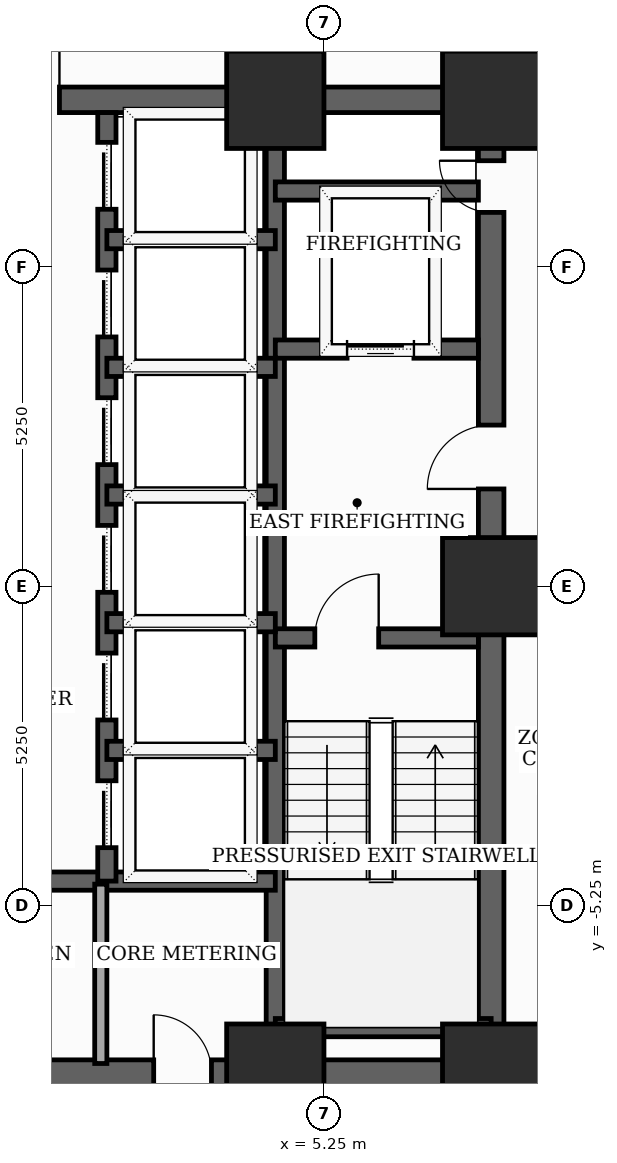
"""IFC4 building model, lengths in metres.
Left out: names, types, materials, properties, quantities, classifications, styles, units other than length and angle.
Written with IfcOpenShell. Run it as: python <this file> out.ifc"""

import sys

from ifc_helpers import new_model, si_unit, direction, frame, frame_2d, origin, origin_2d, place, context, subcontext, project, spatial, rectangle, extrude, element, fill, save


model = new_model("IFC4")
c1 = context("Model", 3, precision=1e-05, world=origin(), true_north=direction((0.0, 1.0)))
c2 = subcontext(c1, "Body", "Model", "MODEL_VIEW")
j1 = project(units=[si_unit("LENGTHUNIT", "METRE"), si_unit("PLANEANGLEUNIT", "RADIAN")], contexts=[c1])
p1 = place(None, origin())
s1 = spatial("IfcSite", under=j1, at=p1, CompositionType="ELEMENT")
p2 = place(p1, origin())
s2 = spatial("IfcBuilding", under=s1, at=p2, CompositionType="ELEMENT")
p3 = place(p2, frame((0.0, 0.0, 44.5)))
s3 = spatial("IfcBuildingStorey", under=s2, at=p3, CompositionType="ELEMENT", Elevation=44.5)
for number, where, z_axis, x_axis in (
    (1, (4.45, -8.0, 0.0), (0.0, 0.0, 1.0), (1.0, 0.0, 0.0)),
    (2, (8.0, -8.0, 0.0), (0.0, 0.0, 1.0), (1.0, 0.0, 0.0)),
    (3, (8.0, 0.0, 0.0), (0.0, 0.0, 1.0), (1.0, 0.0, 0.0)),
    (4, (8.0, 8.0, 0.0), (0.0, 0.0, 1.0), (1.0, 0.0, 0.0)),
    (5, (4.45, 8.0, 0.0), (0.0, 0.0, 1.0), (1.0, 0.0, 0.0)),
):
    element("IfcColumn", number, at=place(p3, frame(where, z_axis=z_axis, x_axis=x_axis)), inside=s3, PredefinedType="COLUMN", context=c2, shape_type="SweptSolid", body=[
        extrude(rectangle(XDim=1.6, YDim=1.6, at=origin_2d()), origin(), (0.0, 0.0, 1.0), 3.7),
    ])
p4 = place(p3, frame((8.0, -8.0, 0.0), z_axis=(0.0, 0.0, 1.0), x_axis=(0.0, 1.0, 0.0)))
e6 = element("IfcWall", 6, at=p4, inside=s3, PredefinedType="SHEAR", context=c2, shape_type="SweptSolid", body=[
    extrude(rectangle(XDim=16.0, YDim=0.42, at=frame_2d((8.0, 0.0))), origin(), (0.0, 0.0, 1.0), 3.5),
])
p5 = place(p4, frame((9.6, 0.0, 0.0)))
e7 = element("IfcOpeningElement", 7, at=p5, cuts=e6, PredefinedType="OPENING", context=c2, shape_type="SweptSolid", body=[
    extrude(rectangle(XDim=1.05, YDim=2.15, at=frame_2d((0.525, 1.075))), frame((0.0, 0.22, 0.0), z_axis=(0.0, -1.0, 0.0), x_axis=(1.0, 0.0, 0.0)), (0.0, 0.0, 1.0), 0.44),
])
p6 = place(p4, frame((14.148, 0.0, 0.0)))
e8 = element("IfcOpeningElement", 8, at=p6, cuts=e6, PredefinedType="OPENING", context=c2, shape_type="SweptSolid", body=[
    extrude(rectangle(XDim=0.85, YDim=2.02, at=frame_2d((0.425, 1.01))), frame((0.0, 0.22, 0.0), z_axis=(0.0, -1.0, 0.0), x_axis=(1.0, 0.0, 0.0)), (0.0, 0.0, 1.0), 0.44),
])
p7 = place(p3, frame((-8.0, -8.0, 0.0), z_axis=(0.0, 0.0, 1.0), x_axis=(1.0, 0.0, 0.0)))
e9 = element("IfcWall", 9, at=p7, inside=s3, PredefinedType="SHEAR", context=c2, shape_type="SweptSolid", body=[
    extrude(rectangle(XDim=16.0, YDim=0.42, at=frame_2d((8.0, 0.0))), origin(), (0.0, 0.0, 1.0), 3.5),
])
p8 = place(p7, frame((4.6, 0.0, 0.0)))
e10 = element("IfcOpeningElement", 10, at=p8, cuts=e9, PredefinedType="OPENING", context=c2, shape_type="SweptSolid", body=[
    extrude(rectangle(XDim=0.95, YDim=2.1, at=frame_2d((0.475, 1.05))), frame((0.0, 0.22, 0.0), z_axis=(0.0, -1.0, 0.0), x_axis=(1.0, 0.0, 0.0)), (0.0, 0.0, 1.0), 0.44),
])
p9 = place(p7, frame((7.52, 0.0, 0.0)))
e11 = element("IfcOpeningElement", 11, at=p9, cuts=e9, PredefinedType="OPENING", context=c2, shape_type="SweptSolid", body=[
    extrude(rectangle(XDim=0.95, YDim=2.1, at=frame_2d((0.475, 1.05))), frame((0.0, 0.22, 0.0), z_axis=(0.0, -1.0, 0.0), x_axis=(1.0, 0.0, 0.0)), (0.0, 0.0, 1.0), 0.44),
])
p10 = place(p7, frame((10.45, 0.0, 0.0)))
e12 = element("IfcOpeningElement", 12, at=p10, cuts=e9, PredefinedType="OPENING", context=c2, shape_type="SweptSolid", body=[
    extrude(rectangle(XDim=0.95, YDim=2.1, at=frame_2d((0.475, 1.05))), frame((0.0, 0.22, 0.0), z_axis=(0.0, -1.0, 0.0), x_axis=(1.0, 0.0, 0.0)), (0.0, 0.0, 1.0), 0.44),
])
p11 = place(p3, frame((-8.0, 8.0, 0.0), z_axis=(0.0, 0.0, 1.0), x_axis=(1.0, 0.0, 0.0)))
e13 = element("IfcWall", 13, at=p11, inside=s3, PredefinedType="SHEAR", context=c2, shape_type="SweptSolid", body=[
    extrude(rectangle(XDim=16.0, YDim=0.42, at=frame_2d((8.0, 0.0))), origin(), (0.0, 0.0, 1.0), 3.5),
])
p12 = place(p11, frame((7.1, 0.0, 0.0)))
e14 = element("IfcOpeningElement", 14, at=p12, cuts=e13, PredefinedType="OPENING", context=c2, shape_type="SweptSolid", body=[
    extrude(rectangle(XDim=1.8, YDim=2.15, at=frame_2d((0.9, 1.075))), frame((0.0, 0.22, 0.0), z_axis=(0.0, -1.0, 0.0), x_axis=(1.0, 0.0, 0.0)), (0.0, 0.0, 1.0), 0.44),
])
p13 = place(p3, frame((4.45, -7.79, 0.0), z_axis=(0.0, 0.0, 1.0), x_axis=(0.0, 1.0, 0.0)))
e15 = element("IfcWall", 15, at=p13, inside=s3, PredefinedType="SHEAR", context=c2, shape_type="SweptSolid", body=[
    extrude(rectangle(XDim=15.58, YDim=0.3, at=frame_2d((7.79, 0.0))), origin(), (0.0, 0.0, 1.0), 3.5),
])
p14 = place(p3, frame((4.45, -0.85, 0.0), z_axis=(0.0, 0.0, 1.0), x_axis=(1.0, 0.0, 0.0)))
e16 = element("IfcWall", 16, at=p14, inside=s3, PredefinedType="SHEAR", context=c2, shape_type="SweptSolid", body=[
    extrude(rectangle(XDim=3.34, YDim=0.3, at=frame_2d((1.67, 0.0))), origin(), (0.0, 0.0, 1.0), 3.5),
])
p15 = place(p14, frame((0.65, 0.0, 0.0)))
e17 = element("IfcOpeningElement", 17, at=p15, cuts=e16, PredefinedType="OPENING", context=c2, shape_type="SweptSolid", body=[
    extrude(rectangle(XDim=1.05, YDim=2.15, at=frame_2d((0.525, 1.075))), frame((0.0, 0.16, 0.0), z_axis=(0.0, -1.0, 0.0), x_axis=(1.0, 0.0, 0.0)), (0.0, 0.0, 1.0), 0.32),
])
p16 = place(p3, frame((4.45, -7.26, 0.0), z_axis=(0.0, 0.0, 1.0), x_axis=(1.0, 0.0, 0.0)))
e18 = element("IfcWall", 18, at=p16, inside=s3, PredefinedType="SHEAR", context=c2, shape_type="SweptSolid", body=[
    extrude(rectangle(XDim=3.55, YDim=0.3, at=frame_2d((1.775, 0.0))), origin(), (0.0, 0.0, 1.0), 3.5),
])
p17 = place(p3, frame((4.45, 3.9, 0.0), z_axis=(0.0, 0.0, 1.0), x_axis=(1.0, 0.0, 0.0)))
e19 = element("IfcWall", 19, at=p17, inside=s3, PredefinedType="SHEAR", context=c2, shape_type="SweptSolid", body=[
    extrude(rectangle(XDim=3.34, YDim=0.3, at=frame_2d((1.67, 0.0))), origin(), (0.0, 0.0, 1.0), 3.5),
])
p18 = place(p17, frame((1.18, 0.0, 0.0)))
e20 = element("IfcOpeningElement", 20, at=p18, cuts=e19, PredefinedType="OPENING", context=c2, shape_type="SweptSolid", body=[
    extrude(rectangle(XDim=1.1, YDim=2.1, at=frame_2d((0.55, 1.05))), frame((0.0, 0.16, 0.0), z_axis=(0.0, -1.0, 0.0), x_axis=(1.0, 0.0, 0.0)), (0.0, 0.0, 1.0), 0.32),
])
p19 = place(p3, frame((4.45, 6.5, 0.0), z_axis=(0.0, 0.0, 1.0), x_axis=(1.0, 0.0, 0.0)))
e21 = element("IfcWall", 21, at=p19, inside=s3, PredefinedType="SHEAR", context=c2, shape_type="SweptSolid", body=[
    extrude(rectangle(XDim=3.34, YDim=0.3, at=frame_2d((1.67, 0.0))), origin(), (0.0, 0.0, 1.0), 3.5),
])
p20 = place(p3, frame((-4.45, -4.85, 0.0), z_axis=(0.0, 0.0, 1.0), x_axis=(1.0, 0.0, 0.0)))
e22 = element("IfcWall", 22, at=p20, inside=s3, PredefinedType="SHEAR", context=c2, shape_type="SweptSolid", body=[
    extrude(rectangle(XDim=8.9, YDim=0.3, at=frame_2d((4.45, 0.0))), origin(), (0.0, 0.0, 1.0), 3.5),
])
p21 = place(p3, frame((1.68, -4.85, 0.0), z_axis=(0.0, 0.0, 1.0), x_axis=(0.0, 1.0, 0.0)))
e23 = element("IfcWall", 23, at=p21, inside=s3, PredefinedType="SHEAR", context=c2, shape_type="SweptSolid", body=[
    extrude(rectangle(XDim=12.64, YDim=0.3, at=frame_2d((6.32, 0.0))), origin(), (0.0, 0.0, 1.0), 3.5),
])
p22 = place(p21, frame((0.55, 0.0, 0.0)))
e24 = element("IfcOpeningElement", 24, at=p22, cuts=e23, PredefinedType="OPENING", context=c2, shape_type="SweptSolid", body=[
    extrude(rectangle(XDim=1.1, YDim=2.1, at=frame_2d((0.55, 1.05))), frame((0.0, 0.16, 0.0), z_axis=(0.0, -1.0, 0.0), x_axis=(1.0, 0.0, 0.0)), (0.0, 0.0, 1.0), 0.32),
])
p23 = place(p21, frame((2.65, 0.0, 0.0)))
e25 = element("IfcOpeningElement", 25, at=p23, cuts=e23, PredefinedType="OPENING", context=c2, shape_type="SweptSolid", body=[
    extrude(rectangle(XDim=1.1, YDim=2.1, at=frame_2d((0.55, 1.05))), frame((0.0, 0.16, 0.0), z_axis=(0.0, -1.0, 0.0), x_axis=(1.0, 0.0, 0.0)), (0.0, 0.0, 1.0), 0.32),
])
p24 = place(p21, frame((4.75, 0.0, 0.0)))
e26 = element("IfcOpeningElement", 26, at=p24, cuts=e23, PredefinedType="OPENING", context=c2, shape_type="SweptSolid", body=[
    extrude(rectangle(XDim=1.1, YDim=2.1, at=frame_2d((0.55, 1.05))), frame((0.0, 0.16, 0.0), z_axis=(0.0, -1.0, 0.0), x_axis=(1.0, 0.0, 0.0)), (0.0, 0.0, 1.0), 0.32),
])
p25 = place(p21, frame((6.85, 0.0, 0.0)))
e27 = element("IfcOpeningElement", 27, at=p25, cuts=e23, PredefinedType="OPENING", context=c2, shape_type="SweptSolid", body=[
    extrude(rectangle(XDim=1.1, YDim=2.1, at=frame_2d((0.55, 1.05))), frame((0.0, 0.16, 0.0), z_axis=(0.0, -1.0, 0.0), x_axis=(1.0, 0.0, 0.0)), (0.0, 0.0, 1.0), 0.32),
])
p26 = place(p21, frame((8.95, 0.0, 0.0)))
e28 = element("IfcOpeningElement", 28, at=p26, cuts=e23, PredefinedType="OPENING", context=c2, shape_type="SweptSolid", body=[
    extrude(rectangle(XDim=1.1, YDim=2.1, at=frame_2d((0.55, 1.05))), frame((0.0, 0.16, 0.0), z_axis=(0.0, -1.0, 0.0), x_axis=(1.0, 0.0, 0.0)), (0.0, 0.0, 1.0), 0.32),
])
p27 = place(p21, frame((11.05, 0.0, 0.0)))
e29 = element("IfcOpeningElement", 29, at=p27, cuts=e23, PredefinedType="OPENING", context=c2, shape_type="SweptSolid", body=[
    extrude(rectangle(XDim=1.1, YDim=2.1, at=frame_2d((0.55, 1.05))), frame((0.0, 0.16, 0.0), z_axis=(0.0, -1.0, 0.0), x_axis=(1.0, 0.0, 0.0)), (0.0, 0.0, 1.0), 0.32),
])
for number, where, z_axis, x_axis in (
    (30, (1.68, 1.5, 0.0), (0.0, 0.0, 1.0), (1.0, 0.0, 0.0)),
    (31, (1.68, 3.6, 0.0), (0.0, 0.0, 1.0), (1.0, 0.0, 0.0)),
    (32, (1.68, 5.7, 0.0), (0.0, 0.0, 1.0), (1.0, 0.0, 0.0)),
    (33, (1.68, -2.7, 0.0), (0.0, 0.0, 1.0), (1.0, 0.0, 0.0)),
    (34, (1.68, -0.6, 0.0), (0.0, 0.0, 1.0), (1.0, 0.0, 0.0)),
):
    element("IfcWall", number, at=place(p3, frame(where, z_axis=z_axis, x_axis=x_axis)), inside=s3, PredefinedType="SHEAR", context=c2, shape_type="SweptSolid", body=[
        extrude(rectangle(XDim=2.77, YDim=0.3, at=frame_2d((1.385, 0.0))), origin(), (0.0, 0.0, 1.0), 3.5),
    ])
p28 = place(p3, frame((1.58, -7.85, 0.0), z_axis=(0.0, 0.0, 1.0), x_axis=(0.0, 1.0, 0.0)))
e35 = element("IfcWall", 35, at=p28, inside=s3, PredefinedType="SOLIDWALL", context=c2, shape_type="SweptSolid", body=[
    extrude(rectangle(XDim=2.95, YDim=0.2, at=frame_2d((1.475, 0.0))), origin(), (0.0, 0.0, 1.0), 2.885),
])
p29 = place(p5, origin())
e36 = element("IfcDoor", 36, at=p29, inside=s3, OperationType="SINGLE_SWING_LEFT", PredefinedType="DOOR", context=c2, shape_type="SweptSolid", body=[
    extrude(rectangle(XDim=1.05, YDim=2.15, at=frame_2d((0.525, 1.075))), frame((0.0, 0.025, 0.0), z_axis=(0.0, -1.0, 0.0), x_axis=(1.0, 0.0, 0.0)), (0.0, 0.0, 1.0), 0.05),
])
fill(e7, e36)
p30 = place(p6, origin())
e37 = element("IfcDoor", 37, at=p30, inside=s3, OperationType="SINGLE_SWING_RIGHT", PredefinedType="TRAPDOOR", context=c2, shape_type="SweptSolid", body=[
    extrude(rectangle(XDim=0.85, YDim=2.02, at=frame_2d((0.425, 1.01))), frame((0.0, 0.025, 0.0), z_axis=(0.0, -1.0, 0.0), x_axis=(1.0, 0.0, 0.0)), (0.0, 0.0, 1.0), 0.05),
])
fill(e8, e37)
p31 = place(p10, origin())
e38 = element("IfcDoor", 38, at=p31, inside=s3, OperationType="SINGLE_SWING_LEFT", PredefinedType="DOOR", context=c2, shape_type="SweptSolid", body=[
    extrude(rectangle(XDim=0.95, YDim=2.1, at=frame_2d((0.475, 1.05))), frame((0.0, 0.025, 0.0), z_axis=(0.0, -1.0, 0.0), x_axis=(1.0, 0.0, 0.0)), (0.0, 0.0, 1.0), 0.05),
])
fill(e12, e38)
p32 = place(p12, origin())
e39 = element("IfcDoor", 39, at=p32, inside=s3, OperationType="DOUBLE_DOOR_SINGLE_SWING", PredefinedType="DOOR", context=c2, shape_type="SweptSolid", body=[
    extrude(rectangle(XDim=1.8, YDim=2.15, at=frame_2d((0.9, 1.075))), frame((0.0, 0.025, 0.0), z_axis=(0.0, -1.0, 0.0), x_axis=(1.0, 0.0, 0.0)), (0.0, 0.0, 1.0), 0.05),
])
fill(e14, e39)
p33 = place(p15, origin())
e40 = element("IfcDoor", 40, at=p33, inside=s3, OperationType="SINGLE_SWING_RIGHT", PredefinedType="DOOR", context=c2, shape_type="SweptSolid", body=[
    extrude(rectangle(XDim=1.05, YDim=2.15, at=frame_2d((0.525, 1.075))), frame((0.0, 0.025, 0.0), z_axis=(0.0, -1.0, 0.0), x_axis=(1.0, 0.0, 0.0)), (0.0, 0.0, 1.0), 0.05),
])
fill(e17, e40)
p34 = place(p18, origin())
e41 = element("IfcDoor", 41, at=p34, inside=s3, OperationType="SLIDING_TO_LEFT", PredefinedType="DOOR", context=c2, shape_type="SweptSolid", body=[
    extrude(rectangle(XDim=1.1, YDim=2.1, at=frame_2d((0.55, 1.05))), frame((0.0, 0.025, 0.0), z_axis=(0.0, -1.0, 0.0), x_axis=(1.0, 0.0, 0.0)), (0.0, 0.0, 1.0), 0.05),
])
fill(e20, e41)
p35 = place(p22, origin())
e42 = element("IfcDoor", 42, at=p35, inside=s3, OperationType="SLIDING_TO_LEFT", PredefinedType="DOOR", context=c2, shape_type="SweptSolid", body=[
    extrude(rectangle(XDim=1.1, YDim=2.1, at=frame_2d((0.55, 1.05))), frame((0.0, 0.025, 0.0), z_axis=(0.0, -1.0, 0.0), x_axis=(1.0, 0.0, 0.0)), (0.0, 0.0, 1.0), 0.05),
])
fill(e24, e42)
p36 = place(p23, origin())
e43 = element("IfcDoor", 43, at=p36, inside=s3, OperationType="SLIDING_TO_LEFT", PredefinedType="DOOR", context=c2, shape_type="SweptSolid", body=[
    extrude(rectangle(XDim=1.1, YDim=2.1, at=frame_2d((0.55, 1.05))), frame((0.0, 0.025, 0.0), z_axis=(0.0, -1.0, 0.0), x_axis=(1.0, 0.0, 0.0)), (0.0, 0.0, 1.0), 0.05),
])
fill(e25, e43)
p37 = place(p24, origin())
e44 = element("IfcDoor", 44, at=p37, inside=s3, OperationType="SLIDING_TO_LEFT", PredefinedType="DOOR", context=c2, shape_type="SweptSolid", body=[
    extrude(rectangle(XDim=1.1, YDim=2.1, at=frame_2d((0.55, 1.05))), frame((0.0, 0.025, 0.0), z_axis=(0.0, -1.0, 0.0), x_axis=(1.0, 0.0, 0.0)), (0.0, 0.0, 1.0), 0.05),
])
fill(e26, e44)
p38 = place(p25, origin())
e45 = element("IfcDoor", 45, at=p38, inside=s3, OperationType="SLIDING_TO_LEFT", PredefinedType="DOOR", context=c2, shape_type="SweptSolid", body=[
    extrude(rectangle(XDim=1.1, YDim=2.1, at=frame_2d((0.55, 1.05))), frame((0.0, 0.025, 0.0), z_axis=(0.0, -1.0, 0.0), x_axis=(1.0, 0.0, 0.0)), (0.0, 0.0, 1.0), 0.05),
])
fill(e27, e45)
p39 = place(p26, origin())
e46 = element("IfcDoor", 46, at=p39, inside=s3, OperationType="SLIDING_TO_LEFT", PredefinedType="DOOR", context=c2, shape_type="SweptSolid", body=[
    extrude(rectangle(XDim=1.1, YDim=2.1, at=frame_2d((0.55, 1.05))), frame((0.0, 0.025, 0.0), z_axis=(0.0, -1.0, 0.0), x_axis=(1.0, 0.0, 0.0)), (0.0, 0.0, 1.0), 0.05),
])
fill(e28, e46)
p40 = place(p27, origin())
e47 = element("IfcDoor", 47, at=p40, inside=s3, OperationType="SLIDING_TO_LEFT", PredefinedType="DOOR", context=c2, shape_type="SweptSolid", body=[
    extrude(rectangle(XDim=1.1, YDim=2.1, at=frame_2d((0.55, 1.05))), frame((0.0, 0.025, 0.0), z_axis=(0.0, -1.0, 0.0), x_axis=(1.0, 0.0, 0.0)), (0.0, 0.0, 1.0), 0.05),
])
fill(e29, e47)
save(model, sys.argv[1])
